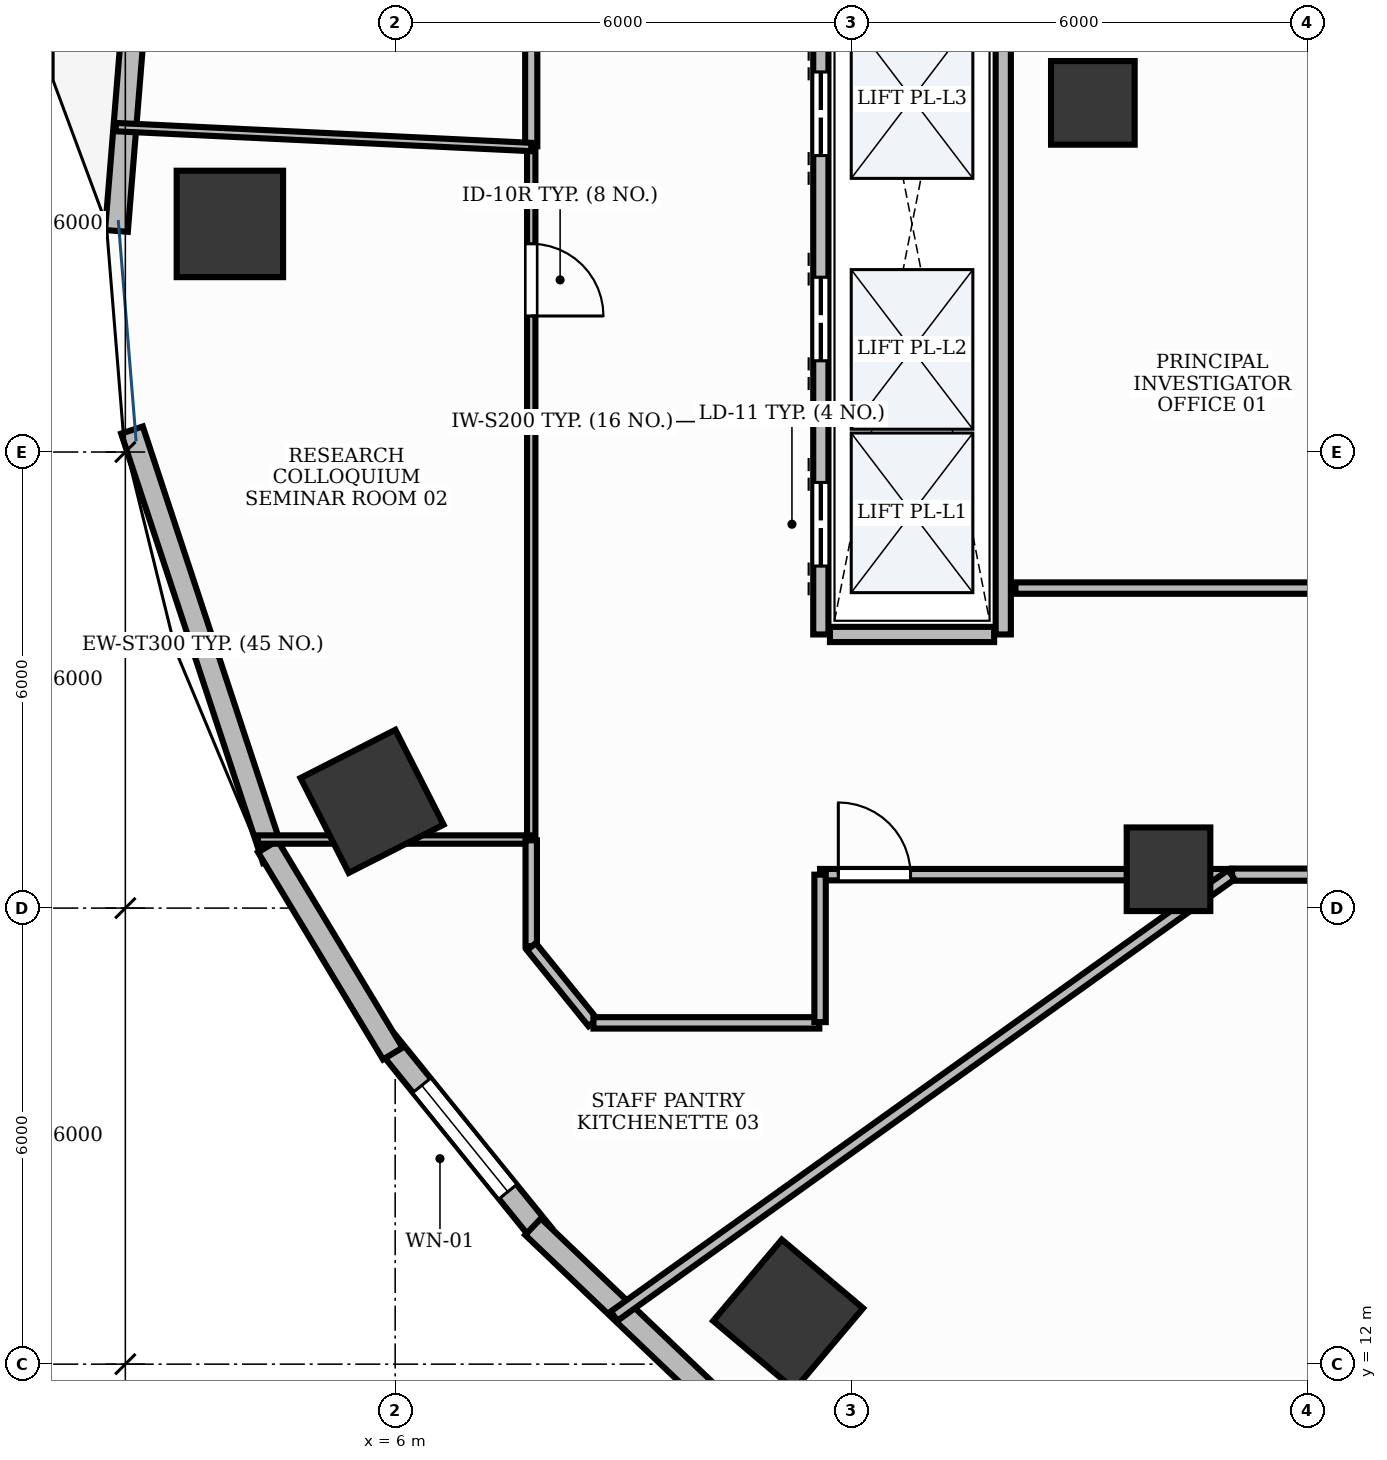
"""IFC4 building model, lengths in metres.
Left out: names, types, materials, properties, quantities, classifications, styles, units other than length and angle.
Written with IfcOpenShell. Run it as: python <this file> out.ifc"""

import sys

from ifc_helpers import new_model, si_unit, direction, frame, frame_2d, origin, origin_2d, place, context, subcontext, project, spatial, rectangle, extrude, element, fill, save


model = new_model("IFC4")
c1 = context("Model", 3, precision=1e-05, world=origin(), true_north=direction((0.0, 1.0)))
c2 = subcontext(c1, "Body", "Model", "MODEL_VIEW")
j1 = project(units=[si_unit("LENGTHUNIT", "METRE"), si_unit("PLANEANGLEUNIT", "RADIAN")], contexts=[c1])
p1 = place(None, origin())
s1 = spatial("IfcSite", under=j1, at=p1, CompositionType="ELEMENT")
p2 = place(p1, origin())
s2 = spatial("IfcBuilding", under=s1, at=p2, CompositionType="ELEMENT")
p3 = place(p2, frame((0.0, 0.0, 34.2)))
s3 = spatial("IfcBuildingStorey", under=s2, at=p3, CompositionType="ELEMENT", Elevation=34.2)
p4 = place(p3, frame((3.825, 27.001, -0.0), z_axis=(0.0, 0.0, 1.0), x_axis=(0.0, 1.0, 0.0)))
e1 = element("IfcColumn", 1, at=p4, inside=s3, PredefinedType="COLUMN", context=c2, shape_type="SweptSolid", body=[
    extrude(rectangle(XDim=1.4, YDim=1.4, at=origin_2d()), origin(), (0.0, 0.0, 1.0), 3.901),
])
p5 = place(p3, frame((15.179, 28.594, -0.0), z_axis=(0.0, 0.0, 1.0), x_axis=(1.0, 0.0, 0.0)))
e2 = element("IfcColumn", 2, at=p5, inside=s3, PredefinedType="COLUMN", context=c2, shape_type="SweptSolid", body=[
    extrude(rectangle(XDim=1.1, YDim=1.1, at=origin_2d()), origin(), (0.0, 0.0, 1.0), 3.901),
])
p6 = place(p3, frame((5.696, 19.404, -0.0), z_axis=(0.0, 0.0, 1.0), x_axis=(-0.453057191132, 0.891481453292, 0.0)))
e3 = element("IfcColumn", 3, at=p6, inside=s3, PredefinedType="COLUMN", context=c2, shape_type="SweptSolid", body=[
    extrude(rectangle(XDim=1.4, YDim=1.4, at=origin_2d()), origin(), (0.0, 0.0, 1.0), 3.901),
])
p7 = place(p3, frame((16.174, 18.511, -0.0), z_axis=(0.0, 0.0, 1.0), x_axis=(1.0, 0.0, 0.0)))
e4 = element("IfcColumn", 4, at=p7, inside=s3, PredefinedType="COLUMN", context=c2, shape_type="SweptSolid", body=[
    extrude(rectangle(XDim=1.1, YDim=1.1, at=origin_2d()), origin(), (0.0, 0.0, 1.0), 3.901),
])
p8 = place(p3, frame((11.17, 12.653, -0.0), z_axis=(0.0, 0.0, 1.0), x_axis=(-0.764246456939, 0.644924300253, 0.0)))
e5 = element("IfcColumn", 5, at=p8, inside=s3, PredefinedType="COLUMN", context=c2, shape_type="SweptSolid", body=[
    extrude(rectangle(XDim=1.4, YDim=1.4, at=origin_2d()), origin(), (0.0, 0.0, 1.0), 3.901),
])
p9 = place(p3, frame((5.894, 16.23, 0.0), z_axis=(0.0, 0.0, 1.0), x_axis=(0.629295540187, -0.777166084631, 0.0)))
e6 = element("IfcWall", 6, at=p9, inside=s3, PredefinedType="STANDARD", context=c2, shape_type="SweptSolid", body=[
    extrude(rectangle(XDim=3.248, YDim=0.3, at=frame_2d((1.624, 0.0))), origin(), (0.0, 0.0, 1.0), 3.9),
])
p10 = place(p9, frame((0.724, 0.0, 0.9)))
e7 = element("IfcOpeningElement", 7, at=p10, cuts=e6, PredefinedType="OPENING", context=c2, shape_type="SweptSolid", body=[
    extrude(rectangle(XDim=1.8, YDim=2.1, at=frame_2d((0.9, 1.05))), frame((0.0, 0.165, 0.0), z_axis=(0.0, -1.0, 0.0), x_axis=(1.0, 0.0, 0.0)), (0.0, 0.0, 1.0), 0.33),
])
p11 = place(p3, frame((2.576, 29.899, 0.0), z_axis=(0.0, 0.0, 1.0), x_axis=(-0.080890160317, -0.996723021689, 0.0)))
e8 = element("IfcWall", 8, at=p11, inside=s3, PredefinedType="STANDARD", context=c2, shape_type="SweptSolid", body=[
    extrude(rectangle(XDim=3.0, YDim=0.3, at=frame_2d((1.5, 0.0))), origin(), (0.0, 0.0, 1.0), 3.9),
])
p12 = place(p3, frame((2.537, 24.289, 0.0), z_axis=(0.0, 0.0, 1.0), x_axis=(0.31372816724, -0.949512841978, 0.0)))
e9 = element("IfcWall", 9, at=p12, inside=s3, PredefinedType="STANDARD", context=c2, shape_type="SweptSolid", body=[
    extrude(rectangle(XDim=5.951, YDim=0.3, at=frame_2d((2.976, 0.0))), origin(), (0.0, 0.0, 1.0), 3.47),
])
p13 = place(p3, frame((4.325, 18.812, 0.0), z_axis=(0.0, 0.0, 1.0), x_axis=(0.516423528484, -0.856333310825, 0.0)))
e10 = element("IfcWall", 10, at=p13, inside=s3, PredefinedType="STANDARD", context=c2, shape_type="SweptSolid", body=[
    extrude(rectangle(XDim=3.183, YDim=0.3, at=frame_2d((1.591, 0.0))), origin(), (0.0, 0.0, 1.0), 3.9),
])
p14 = place(p3, frame((7.814, 13.808, 0.0), z_axis=(0.0, 0.0, 1.0), x_axis=(0.72369587847, -0.69011902994, 0.0)))
e11 = element("IfcWall", 11, at=p14, inside=s3, PredefinedType="STANDARD", context=c2, shape_type="SweptSolid", body=[
    extrude(rectangle(XDim=3.403, YDim=0.3, at=frame_2d((1.701, 0.0))), origin(), (0.0, 0.0, 1.0), 3.9),
])
p15 = place(p3, frame((11.6, 21.6, 0.0), z_axis=(0.0, 0.0, 1.0), x_axis=(0.0, 1.0, 0.0)))
e12 = element("IfcWall", 12, at=p15, inside=s3, PredefinedType="PARTITIONING", context=c2, shape_type="SweptSolid", body=[
    extrude(rectangle(XDim=10.8, YDim=0.2, at=frame_2d((5.4, 0.0))), origin(), (0.0, 0.0, 1.0), 2.91),
])
p16 = place(p15, frame((0.9, 0.0, 0.0)))
e13 = element("IfcOpeningElement", 13, at=p16, cuts=e12, PredefinedType="OPENING", context=c2, shape_type="SweptSolid", body=[
    extrude(rectangle(XDim=1.1, YDim=2.2, at=frame_2d((0.55, 1.1))), frame((0.0, 0.115, 0.0), z_axis=(0.0, -1.0, 0.0), x_axis=(1.0, 0.0, 0.0)), (0.0, 0.0, 1.0), 0.23),
])
p17 = place(p15, frame((3.6, 0.0, 0.0)))
e14 = element("IfcOpeningElement", 14, at=p17, cuts=e12, PredefinedType="OPENING", context=c2, shape_type="SweptSolid", body=[
    extrude(rectangle(XDim=1.1, YDim=2.2, at=frame_2d((0.55, 1.1))), frame((0.0, 0.115, 0.0), z_axis=(0.0, -1.0, 0.0), x_axis=(1.0, 0.0, 0.0)), (0.0, 0.0, 1.0), 0.23),
])
p18 = place(p15, frame((6.3, 0.0, 0.0)))
e15 = element("IfcOpeningElement", 15, at=p18, cuts=e12, PredefinedType="OPENING", context=c2, shape_type="SweptSolid", body=[
    extrude(rectangle(XDim=1.1, YDim=2.2, at=frame_2d((0.55, 1.1))), frame((0.0, 0.115, 0.0), z_axis=(0.0, -1.0, 0.0), x_axis=(1.0, 0.0, 0.0)), (0.0, 0.0, 1.0), 0.23),
])
p19 = place(p15, frame((9.0, 0.0, 0.0)))
e16 = element("IfcOpeningElement", 16, at=p19, cuts=e12, PredefinedType="OPENING", context=c2, shape_type="SweptSolid", body=[
    extrude(rectangle(XDim=1.1, YDim=2.2, at=frame_2d((0.55, 1.1))), frame((0.0, 0.115, 0.0), z_axis=(0.0, -1.0, 0.0), x_axis=(1.0, 0.0, 0.0)), (0.0, 0.0, 1.0), 0.23),
])
p20 = place(p3, frame((14.0, 21.6, 0.0), z_axis=(0.0, 0.0, 1.0), x_axis=(0.0, 1.0, 0.0)))
e17 = element("IfcWall", 17, at=p20, inside=s3, PredefinedType="PARTITIONING", context=c2, shape_type="SweptSolid", body=[
    extrude(rectangle(XDim=10.8, YDim=0.2, at=frame_2d((5.4, 0.0))), origin(), (0.0, 0.0, 1.0), 2.91),
])
p21 = place(p3, frame((11.72, 21.6, 0.0), z_axis=(0.0, 0.0, 1.0), x_axis=(1.0, 0.0, 0.0)))
e18 = element("IfcWall", 18, at=p21, inside=s3, PredefinedType="PARTITIONING", context=c2, shape_type="SweptSolid", body=[
    extrude(rectangle(XDim=2.16, YDim=0.2, at=frame_2d((1.08, 0.0))), origin(), (0.0, 0.0, 1.0), 2.91),
])
p22 = place(p3, frame((7.79, 28.013, 0.0), z_axis=(0.0, 0.0, 1.0), x_axis=(0.0, -1.0, 0.0)))
e19 = element("IfcWall", 19, at=p22, inside=s3, PredefinedType="MOVABLE", context=c2, shape_type="SweptSolid", body=[
    extrude(rectangle(XDim=9.111, YDim=0.11, at=frame_2d((4.555, 0.0))), origin(), (0.0, 0.0, 1.0), 2.91),
])
p23 = place(p22, frame((1.273, 0.0, 0.0)))
e20 = element("IfcOpeningElement", 20, at=p23, cuts=e19, PredefinedType="OPENING", context=c2, shape_type="SweptSolid", body=[
    extrude(rectangle(XDim=0.95, YDim=2.15, at=frame_2d((0.475, 1.075))), frame((0.0, 0.07, 0.0), z_axis=(0.0, -1.0, 0.0), x_axis=(1.0, 0.0, 0.0)), (0.0, 0.0, 1.0), 0.14),
])
p24 = place(p3, frame((11.59, 18.44, 0.0), z_axis=(0.0, 0.0, 1.0), x_axis=(1.0, 0.0, 0.0)))
e21 = element("IfcWall", 21, at=p24, inside=s3, PredefinedType="PARTITIONING", context=c2, shape_type="SweptSolid", body=[
    extrude(rectangle(XDim=5.411, YDim=0.15, at=frame_2d((2.706, 0.0))), origin(), (0.0, 0.0, 1.0), 2.91),
])
p25 = place(p24, frame((0.24, 0.0, 0.0)))
e22 = element("IfcOpeningElement", 22, at=p25, cuts=e21, PredefinedType="OPENING", context=c2, shape_type="SweptSolid", body=[
    extrude(rectangle(XDim=0.95, YDim=2.15, at=frame_2d((0.475, 1.075))), frame((0.0, 0.09, 0.0), z_axis=(0.0, -1.0, 0.0), x_axis=(1.0, 0.0, 0.0)), (0.0, 0.0, 1.0), 0.18),
])
p26 = place(p3, frame((17.011, 18.44, 0.0), z_axis=(0.0, 0.0, 1.0), x_axis=(1.0, 0.0, 0.0)))
e23 = element("IfcWall", 23, at=p26, inside=s3, PredefinedType="PARTITIONING", context=c2, shape_type="SweptSolid", body=[
    extrude(rectangle(XDim=6.479, YDim=0.16, at=frame_2d((3.24, 0.0))), origin(), (0.0, 0.0, 1.0), 2.91),
])
p27 = place(p26, frame((3.619, 0.0, 0.0)))
e24 = element("IfcOpeningElement", 24, at=p27, cuts=e23, PredefinedType="OPENING", context=c2, shape_type="SweptSolid", body=[
    extrude(rectangle(XDim=0.95, YDim=2.15, at=frame_2d((0.475, 1.075))), frame((0.0, 0.095, 0.0), z_axis=(0.0, -1.0, 0.0), x_axis=(1.0, 0.0, 0.0)), (0.0, 0.0, 1.0), 0.19),
])
p28 = place(p3, frame((7.79, 36.501, 0.0), z_axis=(0.0, 0.0, 1.0), x_axis=(0.0, -1.0, 0.0)))
e25 = element("IfcWall", 25, at=p28, inside=s3, PredefinedType="PARTITIONING", context=c2, shape_type="SweptSolid", body=[
    extrude(rectangle(XDim=8.478, YDim=0.16, at=frame_2d((4.239, 0.0))), origin(), (0.0, 0.0, 1.0), 2.91),
])
p29 = place(p28, frame((4.95, 0.0, 0.0)))
e26 = element("IfcOpeningElement", 26, at=p29, cuts=e25, PredefinedType="OPENING", context=c2, shape_type="SweptSolid", body=[
    extrude(rectangle(XDim=0.95, YDim=2.15, at=frame_2d((0.475, 1.075))), frame((0.0, 0.095, 0.0), z_axis=(0.0, -1.0, 0.0), x_axis=(1.0, 0.0, 0.0)), (0.0, 0.0, 1.0), 0.19),
])
p30 = place(p3, frame((19.34, 22.21, 0.0), z_axis=(0.0, 0.0, 1.0), x_axis=(-1.0, 0.0, 0.0)))
e27 = element("IfcWall", 27, at=p30, inside=s3, PredefinedType="PARTITIONING", context=c2, shape_type="SweptSolid", body=[
    extrude(rectangle(XDim=5.18, YDim=0.15, at=frame_2d((2.59, 0.0))), origin(), (0.0, 0.0, 1.0), 2.91),
])
p31 = place(p3, frame((2.323, 28.275, 0.0), z_axis=(0.0, 0.0, 1.0), x_axis=(0.998855892644, -0.047821603185, 0.0)))
e28 = element("IfcWall", 28, at=p31, inside=s3, PredefinedType="MOVABLE", context=c2, shape_type="SweptSolid", body=[
    extrude(rectangle(XDim=5.473, YDim=0.11, at=frame_2d((2.736, 0.0))), origin(), (0.0, 0.0, 1.0), 2.91),
])
p32 = place(p3, frame((7.79, 18.902, 0.0), z_axis=(0.0, 0.0, 1.0), x_axis=(-1.0, 0.0, 0.0)))
e29 = element("IfcWall", 29, at=p32, inside=s3, PredefinedType="MOVABLE", context=c2, shape_type="SweptSolid", body=[
    extrude(rectangle(XDim=3.596, YDim=0.11, at=frame_2d((1.798, 0.0))), origin(), (0.0, 0.0, 1.0), 2.91),
])
p33 = place(p3, frame((7.79, 18.892, 0.0), z_axis=(0.0, 0.0, 1.0), x_axis=(0.0, -1.0, 0.0)))
e30 = element("IfcWall", 30, at=p33, inside=s3, PredefinedType="PARTITIONING", context=c2, shape_type="SweptSolid", body=[
    extrude(rectangle(XDim=1.393, YDim=0.15, at=frame_2d((0.697, 0.0))), origin(), (0.0, 0.0, 1.0), 2.91),
])
p34 = place(p3, frame((7.792, 17.492, 0.0), z_axis=(0.0, 0.0, 1.0), x_axis=(0.629225554682, -0.777222748854, 0.0)))
e31 = element("IfcWall", 31, at=p34, inside=s3, PredefinedType="PARTITIONING", context=c2, shape_type="SweptSolid", body=[
    extrude(rectangle(XDim=1.285, YDim=0.15, at=frame_2d((0.643, 0.0))), origin(), (0.0, 0.0, 1.0), 2.91),
])
p35 = place(p3, frame((8.609, 16.49, 0.0), z_axis=(0.0, 0.0, 1.0), x_axis=(1.0, 0.0, 0.0)))
e32 = element("IfcWall", 32, at=p35, inside=s3, PredefinedType="PARTITIONING", context=c2, shape_type="SweptSolid", body=[
    extrude(rectangle(XDim=2.971, YDim=0.15, at=frame_2d((1.486, 0.0))), origin(), (0.0, 0.0, 1.0), 2.91),
])
p36 = place(p3, frame((11.59, 16.5, 0.0), z_axis=(0.0, 0.0, 1.0), x_axis=(0.0, 1.0, 0.0)))
e33 = element("IfcWall", 33, at=p36, inside=s3, PredefinedType="PARTITIONING", context=c2, shape_type="SweptSolid", body=[
    extrude(rectangle(XDim=1.94, YDim=0.15, at=frame_2d((0.97, 0.0))), origin(), (0.0, 0.0, 1.0), 2.91),
])
p37 = place(p3, frame((17.001, 18.44, 0.0), z_axis=(0.0, 0.0, 1.0), x_axis=(-0.813397935838, -0.581707656796, 0.0)))
e34 = element("IfcWall", 34, at=p37, inside=s3, PredefinedType="PARTITIONING", context=c2, shape_type="SweptSolid", body=[
    extrude(rectangle(XDim=9.984, YDim=0.15, at=frame_2d((4.992, 0.0))), origin(), (0.0, 0.0, 1.0), 2.91),
])
p38 = place(p10, origin())
e35 = element("IfcWindow", 35, at=p38, inside=s3, PartitioningType="SINGLE_PANEL", PredefinedType="WINDOW", context=c2, shape_type="SweptSolid", body=[
    extrude(rectangle(XDim=1.8, YDim=2.1, at=frame_2d((0.9, 1.05))), frame((0.0, 0.03, 0.0), z_axis=(0.0, -1.0, 0.0), x_axis=(1.0, 0.0, 0.0)), (0.0, 0.0, 1.0), 0.06),
])
fill(e7, e35)
p39 = place(p16, origin())
e36 = element("IfcDoor", 36, at=p39, inside=s3, OperationType="DOUBLE_DOOR_SLIDING", PredefinedType="DOOR", context=c2, shape_type="SweptSolid", body=[
    extrude(rectangle(XDim=1.1, YDim=2.2, at=frame_2d((0.55, 1.1))), frame((0.0, 0.025, 0.0), z_axis=(0.0, -1.0, 0.0), x_axis=(1.0, 0.0, 0.0)), (0.0, 0.0, 1.0), 0.05),
])
fill(e13, e36)
p40 = place(p17, origin())
e37 = element("IfcDoor", 37, at=p40, inside=s3, OperationType="DOUBLE_DOOR_SLIDING", PredefinedType="DOOR", context=c2, shape_type="SweptSolid", body=[
    extrude(rectangle(XDim=1.1, YDim=2.2, at=frame_2d((0.55, 1.1))), frame((0.0, 0.025, 0.0), z_axis=(0.0, -1.0, 0.0), x_axis=(1.0, 0.0, 0.0)), (0.0, 0.0, 1.0), 0.05),
])
fill(e14, e37)
p41 = place(p18, origin())
e38 = element("IfcDoor", 38, at=p41, inside=s3, OperationType="DOUBLE_DOOR_SLIDING", PredefinedType="DOOR", context=c2, shape_type="SweptSolid", body=[
    extrude(rectangle(XDim=1.1, YDim=2.2, at=frame_2d((0.55, 1.1))), frame((0.0, 0.025, 0.0), z_axis=(0.0, -1.0, 0.0), x_axis=(1.0, 0.0, 0.0)), (0.0, 0.0, 1.0), 0.05),
])
fill(e15, e38)
p42 = place(p23, origin())
e39 = element("IfcDoor", 39, at=p42, inside=s3, OperationType="SINGLE_SWING_RIGHT", PredefinedType="DOOR", context=c2, shape_type="SweptSolid", body=[
    extrude(rectangle(XDim=0.95, YDim=2.15, at=frame_2d((0.475, 1.075))), frame((0.0, 0.025, 0.0), z_axis=(0.0, -1.0, 0.0), x_axis=(1.0, 0.0, 0.0)), (0.0, 0.0, 1.0), 0.05),
])
fill(e20, e39)
p43 = place(p25, origin())
e40 = element("IfcDoor", 40, at=p43, inside=s3, OperationType="SINGLE_SWING_LEFT", PredefinedType="DOOR", context=c2, shape_type="SweptSolid", body=[
    extrude(rectangle(XDim=0.95, YDim=2.15, at=frame_2d((0.475, 1.075))), frame((0.0, 0.025, 0.0), z_axis=(0.0, -1.0, 0.0), x_axis=(1.0, 0.0, 0.0)), (0.0, 0.0, 1.0), 0.05),
])
fill(e22, e40)
save(model, sys.argv[1])
